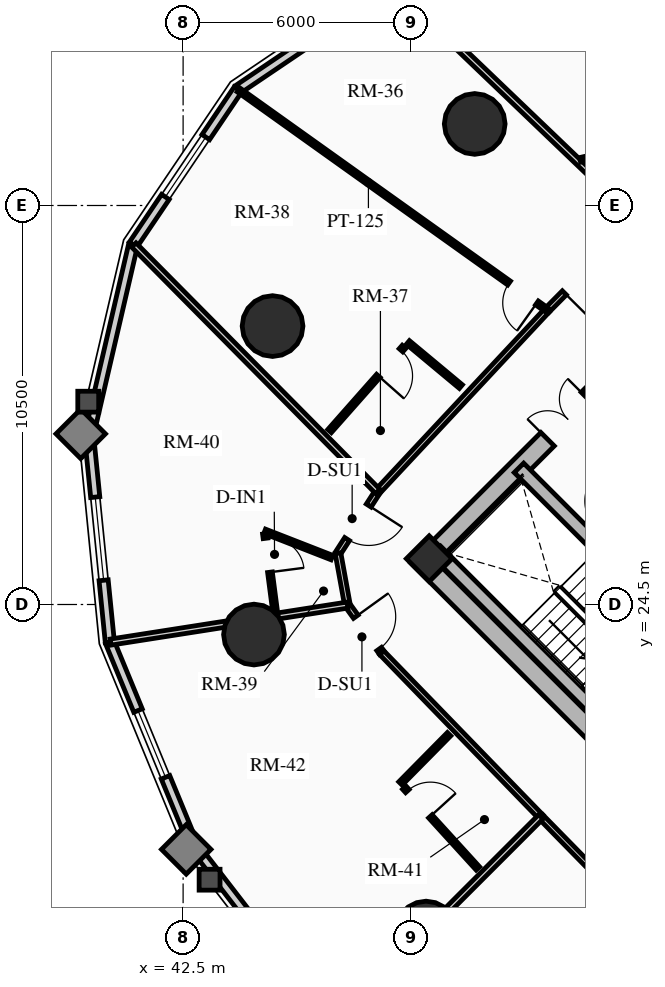
"""IFC4 building model, lengths in metres.
Left out: names, types, materials, properties, quantities, classifications, styles, units other than length and angle.
Written with IfcOpenShell. Run it as: python <this file> out.ifc"""

import sys

from ifc_helpers import new_model, si_unit, direction, frame, frame_2d, origin, origin_2d, place, context, subcontext, project, spatial, rectangle, circle, extrude, source, transform, mapped, element, fill, save


model = new_model("IFC4")
c1 = context("Model", 3, precision=1e-05, world=origin(), true_north=direction((0.0, 1.0)))
c2 = subcontext(c1, "Body", "Model", "MODEL_VIEW")
j1 = project(units=[si_unit("LENGTHUNIT", "METRE"), si_unit("PLANEANGLEUNIT", "RADIAN")], contexts=[c1])
p1 = place(None, origin())
s1 = spatial("IfcSite", under=j1, at=p1, CompositionType="ELEMENT")
p2 = place(p1, origin())
s2 = spatial("IfcBuilding", under=s1, at=p2, CompositionType="ELEMENT")
p3 = place(p2, frame((0.0, 0.0, 48.19)))
s3 = spatial("IfcBuildingStorey", under=s2, at=p3, CompositionType="ELEMENT", Elevation=48.19)
p4 = place(p3, frame((58.773, 15.661, 0.0), z_axis=(0.0, 0.0, 1.0), x_axis=(-0.707106781187, 0.707106781187, 0.0)))
e1 = element("IfcWall", 1, at=p4, inside=s3, PredefinedType="SHEAR", context=c2, shape_type="SweptSolid", body=[
    extrude(rectangle(XDim=14.3, YDim=0.5, at=frame_2d((7.15, 0.0))), origin(), (0.0, 0.0, 1.0), 2.91),
])
p5 = place(p3, frame((48.838, 25.596, 0.0), z_axis=(0.0, 0.0, 1.0), x_axis=(0.707106781187, 0.707106781187, 0.0)))
e2 = element("IfcWall", 2, at=p5, inside=s3, PredefinedType="SHEAR", context=c2, shape_type="SweptSolid", body=[
    extrude(rectangle(XDim=10.7, YDim=0.5, at=frame_2d((5.35, 0.0))), origin(), (0.0, 0.0, 1.0), 2.91),
])
m1 = source(origin(), c2, "Body", "SweptSolid", [
    extrude(rectangle(XDim=1.5, YDim=2.02, at=frame_2d((0.75, 1.01))), frame((0.0, 0.26, 0.0), z_axis=(0.0, -1.0, 0.0), x_axis=(1.0, 0.0, 0.0)), (0.0, 0.0, 1.0), 0.52),
])
p6 = place(p5, frame((4.6, 0.0, 0.0)))
e3 = element("IfcOpeningElement", 3, at=p6, cuts=e2, PredefinedType="OPENING", context=c2, shape_type="MappedRepresentation", body=[
    mapped(m1, transform((0.0, 0.0, 0.0), x_axis=(1.0, 0.0, 0.0), y_axis=(0.0, 1.0, 0.0), z_axis=(0.0, 0.0, 1.0), scale=1.0)),
])
p7 = place(p3, frame((61.096, 18.338, 0.0), z_axis=(0.0, 0.0, 1.0), x_axis=(-0.707106781187, 0.707106781187, 0.0)))
e4 = element("IfcWall", 4, at=p7, inside=s3, PredefinedType="SHEAR", context=c2, shape_type="SweptSolid", body=[
    extrude(rectangle(XDim=13.8, YDim=0.35, at=frame_2d((6.9, 0.0))), origin(), (0.0, 0.0, 1.0), 2.91),
])
m2 = source(origin(), c2, "Body", "SweptSolid", [
    extrude(rectangle(XDim=1.1, YDim=2.015, at=frame_2d((0.55, 1.007))), frame((0.0, 0.185, 0.0), z_axis=(0.0, -1.0, 0.0), x_axis=(1.0, 0.0, 0.0)), (0.0, 0.0, 1.0), 0.37),
])
p8 = place(p7, frame((4.9, 0.0, 0.0)))
e5 = element("IfcOpeningElement", 5, at=p8, cuts=e4, PredefinedType="OPENING", context=c2, shape_type="MappedRepresentation", body=[
    mapped(m2, transform((0.0, 0.0, 0.0), x_axis=(1.0, 0.0, 0.0), y_axis=(0.0, 1.0, 0.0), z_axis=(0.0, 0.0, 1.0), scale=1.0)),
])
m3 = source(origin(), c2, "Body", "SweptSolid", [
    extrude(rectangle(XDim=1.15, YDim=2.02, at=frame_2d((0.575, 1.01))), frame((0.0, 0.185, 0.0), z_axis=(0.0, -1.0, 0.0), x_axis=(1.0, 0.0, 0.0)), (0.0, 0.0, 1.0), 0.37),
])
p9 = place(p7, frame((7.32, 0.0, 0.0)))
e6 = element("IfcOpeningElement", 6, at=p9, cuts=e4, PredefinedType="OPENING", context=c2, shape_type="MappedRepresentation", body=[
    mapped(m3, transform((0.0, 0.0, 0.0), x_axis=(1.0, 0.0, 0.0), y_axis=(0.0, 1.0, 0.0), z_axis=(0.0, 0.0, 1.0), scale=1.0)),
])
p10 = place(p3, frame((53.922, 21.141, 0.0), z_axis=(0.0, 0.0, 1.0), x_axis=(-0.707106781187, 0.707106781187, 0.0)))
e7 = element("IfcWall", 7, at=p10, inside=s3, PredefinedType="SHEAR", context=c2, shape_type="SweptSolid", body=[
    extrude(rectangle(XDim=6.745, YDim=0.35, at=frame_2d((3.373, 0.0))), origin(), (0.0, 0.0, 1.0), 2.91),
])
p11 = place(p3, frame((48.976, 25.706, 0.0), z_axis=(0.0, 0.0, 1.0), x_axis=(0.707106781187, 0.707106781187, 0.0)))
e8 = element("IfcColumn", 8, at=p11, inside=s3, PredefinedType="COLUMN", context=c2, shape_type="SweptSolid", body=[
    extrude(rectangle(XDim=0.85, YDim=0.85, at=origin_2d()), origin(), (0.0, 0.0, 1.0), 2.91),
])
for number, where, z_axis, x_axis in (
    (9, (50.173, 37.146, 0.0), (0.0, 0.0, 1.0), (1.0, 0.0, 0.0)),
    (10, (44.854, 31.827, 0.0), (0.0, 0.0, 1.0), (1.0, 0.0, 0.0)),
    (11, (44.365, 23.709, 0.0), (0.0, 0.0, 1.0), (1.0, 0.0, 0.0)),
    (12, (48.893, 15.893, 0.0), (0.0, 0.0, 1.0), (1.0, 0.0, 0.0)),
):
    element("IfcColumn", number, at=place(p3, frame(where, z_axis=z_axis, x_axis=x_axis)), inside=s3, PredefinedType="USERDEFINED", context=c2, shape_type="SweptSolid", body=[
        extrude(circle(Radius=0.8, at=origin_2d()), origin(), (0.0, 0.0, 1.0), 2.91),
    ])
p12 = place(p3, frame((43.945, 38.055, 0.0), z_axis=(0.0, 0.0, 1.0), x_axis=(0.828736708604, 0.559638693991, 0.0)))
e13 = element("IfcWall", 13, at=p12, inside=s3, PredefinedType="SOLIDWALL", context=c2, shape_type="SweptSolid", body=[
    extrude(rectangle(XDim=4.93, YDim=0.24, at=frame_2d((2.465, 0.0))), origin(), (0.0, 0.0, 1.0), 2.073),
])
p13 = place(p3, frame((41.186, 33.969, 0.0), z_axis=(0.0, 0.0, 1.0), x_axis=(0.559638693991, 0.828736708604, 0.0)))
e14 = element("IfcWall", 14, at=p13, inside=s3, PredefinedType="SOLIDWALL", context=c2, shape_type="SweptSolid", body=[
    extrude(rectangle(XDim=4.93, YDim=0.24, at=frame_2d((2.465, 0.0))), origin(), (0.0, 0.0, 1.0), 2.073),
])
m4 = source(origin(), c2, "Body", "SweptSolid", [
    extrude(rectangle(XDim=1.9, YDim=1.35, at=frame_2d((0.95, 0.675))), frame((0.0, 0.13, 0.0), z_axis=(0.0, -1.0, 0.0), x_axis=(1.0, 0.0, 0.0)), (0.0, 0.0, 1.0), 0.26),
])
p14 = place(p13, frame((1.515, 0.0, 0.65)))
e15 = element("IfcOpeningElement", 15, at=p14, cuts=e14, PredefinedType="OPENING", context=c2, shape_type="MappedRepresentation", body=[
    mapped(m4, transform((0.0, 0.0, 0.0), x_axis=(1.0, 0.0, 0.0), y_axis=(0.0, 1.0, 0.0), z_axis=(0.0, 0.0, 1.0), scale=1.0)),
])
p15 = place(p3, frame((40.024, 28.957, 0.0), z_axis=(0.0, 0.0, 1.0), x_axis=(0.225833060959, 0.974166016949, 0.0)))
e16 = element("IfcWall", 16, at=p15, inside=s3, PredefinedType="SOLIDWALL", context=c2, shape_type="SweptSolid", body=[
    extrude(rectangle(XDim=5.146, YDim=0.24, at=frame_2d((2.573, 0.0))), origin(), (0.0, 0.0, 1.0), 2.073),
])
p16 = place(p3, frame((40.572, 23.507, 0.0), z_axis=(0.0, 0.0, 1.0), x_axis=(-0.100165739718, 0.994970765694, 0.0)))
e17 = element("IfcWall", 17, at=p16, inside=s3, PredefinedType="SOLIDWALL", context=c2, shape_type="SweptSolid", body=[
    extrude(rectangle(XDim=5.477, YDim=0.24, at=frame_2d((2.738, 0.0))), origin(), (0.0, 0.0, 1.0), 2.073),
])
m5 = source(origin(), c2, "Body", "SweptSolid", [
    extrude(rectangle(XDim=2.2, YDim=1.35, at=frame_2d((1.1, 0.675))), frame((0.0, 0.13, 0.0), z_axis=(0.0, -1.0, 0.0), x_axis=(1.0, 0.0, 0.0)), (0.0, 0.0, 1.0), 0.26),
])
p17 = place(p16, frame((1.638, 0.0, 0.65)))
e18 = element("IfcOpeningElement", 18, at=p17, cuts=e17, PredefinedType="OPENING", context=c2, shape_type="MappedRepresentation", body=[
    mapped(m5, transform((0.0, 0.0, 0.0), x_axis=(1.0, 0.0, 0.0), y_axis=(0.0, 1.0, 0.0), z_axis=(0.0, 0.0, 1.0), scale=1.0)),
])
p18 = place(p3, frame((42.778, 18.156, 0.0), z_axis=(0.0, 0.0, 1.0), x_axis=(-0.381027682565, 0.924563629567, 0.0)))
e19 = element("IfcWall", 19, at=p18, inside=s3, PredefinedType="SOLIDWALL", context=c2, shape_type="SweptSolid", body=[
    extrude(rectangle(XDim=5.789, YDim=0.24, at=frame_2d((2.894, 0.0))), origin(), (0.0, 0.0, 1.0), 2.073),
])
p19 = place(p18, frame((1.944, 0.0, 0.65)))
e20 = element("IfcOpeningElement", 20, at=p19, cuts=e19, PredefinedType="OPENING", context=c2, shape_type="MappedRepresentation", body=[
    mapped(m4, transform((0.0, 0.0, 0.0), x_axis=(1.0, 0.0, 0.0), y_axis=(0.0, 1.0, 0.0), z_axis=(0.0, 0.0, 1.0), scale=1.0)),
])
p20 = place(p3, frame((46.425, 13.425, 0.0), z_axis=(0.0, 0.0, 1.0), x_axis=(-0.610502519057, 0.792014314407, 0.0)))
e21 = element("IfcWall", 21, at=p20, inside=s3, PredefinedType="SOLIDWALL", context=c2, shape_type="SweptSolid", body=[
    extrude(rectangle(XDim=5.973, YDim=0.24, at=frame_2d((2.987, 0.0))), origin(), (0.0, 0.0, 1.0), 2.073),
])
p21 = place(p3, frame((54.461, 34.648, 0.0), z_axis=(0.0, 0.0, 1.0), x_axis=(-0.70403409755, -0.710166170334, 0.0)))
e22 = element("IfcWall", 22, at=p21, inside=s3, PredefinedType="PARTITIONING", context=c2, shape_type="SweptSolid", body=[
    extrude(rectangle(XDim=3.384, YDim=0.15, at=frame_2d((1.692, 0.0))), origin(), (0.0, 0.0, 1.0), 2.159),
])
m6 = source(origin(), c2, "Body", "SweptSolid", [
    extrude(rectangle(XDim=1.05, YDim=2.015, at=frame_2d((0.525, 1.007))), frame((0.0, 0.085, 0.0), z_axis=(0.0, -1.0, 0.0), x_axis=(1.0, 0.0, 0.0)), (0.0, 0.0, 1.0), 0.17),
])
p22 = place(p21, frame((1.691, 0.0, 0.0)))
e23 = element("IfcOpeningElement", 23, at=p22, cuts=e22, PredefinedType="OPENING", context=c2, shape_type="MappedRepresentation", body=[
    mapped(m6, transform((0.0, 0.0, 0.0), x_axis=(1.0, 0.0, 0.0), y_axis=(0.0, 1.0, 0.0), z_axis=(0.0, 0.0, 1.0), scale=1.0)),
])
p23 = place(p3, frame((52.079, 32.244, 0.0), z_axis=(0.0, 0.0, 1.0), x_axis=(-0.682703325574, -0.730695674854, 0.0)))
e24 = element("IfcWall", 24, at=p23, inside=s3, PredefinedType="PARTITIONING", context=c2, shape_type="SweptSolid", body=[
    extrude(rectangle(XDim=6.527, YDim=0.15, at=frame_2d((3.263, 0.0))), origin(), (0.0, 0.0, 1.0), 2.159),
])
p24 = place(p3, frame((47.623, 27.475, 0.0), z_axis=(0.0, 0.0, 1.0), x_axis=(-0.54158041545, -0.840648947898, 0.0)))
e25 = element("IfcWall", 25, at=p24, inside=s3, PredefinedType="PARTITIONING", context=c2, shape_type="SweptSolid", body=[
    extrude(rectangle(XDim=1.934, YDim=0.15, at=frame_2d((0.967, 0.0))), origin(), (0.0, 0.0, 1.0), 2.159),
])
p25 = place(p24, frame((0.442, 0.0, 0.0)))
e26 = element("IfcOpeningElement", 26, at=p25, cuts=e25, PredefinedType="OPENING", context=c2, shape_type="MappedRepresentation", body=[
    mapped(m6, transform((0.0, 0.0, 0.0), x_axis=(1.0, 0.0, 0.0), y_axis=(0.0, 1.0, 0.0), z_axis=(0.0, 0.0, 1.0), scale=1.0)),
])
p26 = place(p3, frame((46.576, 25.85, 0.0), z_axis=(0.0, 0.0, 1.0), x_axis=(0.178962865041, -0.983855829345, 0.0)))
e27 = element("IfcWall", 27, at=p26, inside=s3, PredefinedType="PARTITIONING", context=c2, shape_type="SweptSolid", body=[
    extrude(rectangle(XDim=1.387, YDim=0.15, at=frame_2d((0.694, 0.0))), origin(), (0.0, 0.0, 1.0), 2.159),
])
p27 = place(p3, frame((46.824, 24.485, 0.0), z_axis=(0.0, 0.0, 1.0), x_axis=(0.584890953925, -0.811111935565, 0.0)))
e28 = element("IfcWall", 28, at=p27, inside=s3, PredefinedType="PARTITIONING", context=c2, shape_type="SweptSolid", body=[
    extrude(rectangle(XDim=1.547, YDim=0.15, at=frame_2d((0.773, 0.0))), origin(), (0.0, 0.0, 1.0), 2.205),
])
p28 = place(p27, frame((0.377, 0.0, 0.0)))
e29 = element("IfcOpeningElement", 29, at=p28, cuts=e28, PredefinedType="OPENING", context=c2, shape_type="MappedRepresentation", body=[
    mapped(m6, transform((0.0, 0.0, 0.0), x_axis=(1.0, 0.0, 0.0), y_axis=(0.0, 1.0, 0.0), z_axis=(0.0, 0.0, 1.0), scale=1.0)),
])
p29 = place(p3, frame((47.729, 23.23, 0.0), z_axis=(0.0, 0.0, 1.0), x_axis=(0.696119834292, -0.717925606386, 0.0)))
e30 = element("IfcWall", 30, at=p29, inside=s3, PredefinedType="PARTITIONING", context=c2, shape_type="SweptSolid", body=[
    extrude(rectangle(XDim=6.012, YDim=0.15, at=frame_2d((3.006, 0.0))), origin(), (0.0, 0.0, 1.0), 2.635),
])
p30 = place(p3, frame((51.914, 18.914, 0.0), z_axis=(0.0, 0.0, 1.0), x_axis=(0.6999614951, -0.71418058317, 0.0)))
e31 = element("IfcWall", 31, at=p30, inside=s3, PredefinedType="PARTITIONING", context=c2, shape_type="SweptSolid", body=[
    extrude(rectangle(XDim=6.13, YDim=0.15, at=frame_2d((3.065, 0.0))), origin(), (0.0, 0.0, 1.0), 2.159),
])
p31 = place(p30, frame((2.54, 0.0, 0.0)))
e32 = element("IfcOpeningElement", 32, at=p31, cuts=e31, PredefinedType="OPENING", context=c2, shape_type="MappedRepresentation", body=[
    mapped(m6, transform((0.0, 0.0, 0.0), x_axis=(1.0, 0.0, 0.0), y_axis=(0.0, 1.0, 0.0), z_axis=(0.0, 0.0, 1.0), scale=1.0)),
])
p32 = place(p3, frame((54.461, 34.648, 0.0), z_axis=(0.0, 0.0, 1.0), x_axis=(-0.722290498621, 0.691589788532, 0.0)))
e33 = element("IfcWall", 33, at=p32, inside=s3, PredefinedType="PARTITIONING", context=c2, shape_type="SweptSolid", body=[
    extrude(rectangle(XDim=8.891, YDim=0.16, at=frame_2d((4.445, 0.0))), origin(), (0.0, 0.0, 1.0), 2.073),
])
p33 = place(p3, frame((47.623, 27.475, 0.0), z_axis=(0.0, 0.0, 1.0), x_axis=(-0.703512438021, 0.71068294587, 0.0)))
e34 = element("IfcWall", 34, at=p33, inside=s3, PredefinedType="PARTITIONING", context=c2, shape_type="SweptSolid", body=[
    extrude(rectangle(XDim=9.125, YDim=0.16, at=frame_2d((4.562, 0.0))), origin(), (0.0, 0.0, 1.0), 2.073),
])
p34 = place(p3, frame((46.824, 24.485, 0.0), z_axis=(0.0, 0.0, 1.0), x_axis=(-0.988003730645, -0.154430010784, 0.0)))
e35 = element("IfcWall", 35, at=p34, inside=s3, PredefinedType="PARTITIONING", context=c2, shape_type="SweptSolid", body=[
    extrude(rectangle(XDim=6.308, YDim=0.16, at=frame_2d((3.154, 0.0))), origin(), (0.0, 0.0, 1.0), 2.073),
])
p35 = place(p3, frame((51.914, 18.914, 0.0), z_axis=(0.0, 0.0, 1.0), x_axis=(-0.707106781187, -0.707106781187, 0.0)))
e36 = element("IfcWall", 36, at=p35, inside=s3, PredefinedType="PARTITIONING", context=c2, shape_type="SweptSolid", body=[
    extrude(rectangle(XDim=7.743, YDim=0.16, at=frame_2d((3.872, 0.0))), origin(), (0.0, 0.0, 1.0), 2.073),
])
p36 = place(p3, frame((54.878, 36.644, 0.0), z_axis=(0.0, 0.0, 1.0), x_axis=(-0.974554917581, -0.224148862631, 0.0)))
e37 = element("IfcWall", 37, at=p36, inside=s3, PredefinedType="PARTITIONING", context=c2, shape_type="SweptSolid", body=[
    extrude(rectangle(XDim=1.982, YDim=0.125, at=frame_2d((0.991, 0.0))), origin(), (0.0, 0.0, 1.0), 2.635),
])
m7 = source(origin(), c2, "Body", "SweptSolid", [
    extrude(rectangle(XDim=0.9, YDim=2.005, at=frame_2d((0.45, 1.002))), frame((0.0, 0.073, 0.0), z_axis=(0.0, -1.0, 0.0), x_axis=(1.0, 0.0, 0.0)), (0.0, 0.0, 1.0), 0.145),
])
p37 = place(p36, frame((0.436, 0.0, 0.0)))
e38 = element("IfcOpeningElement", 38, at=p37, cuts=e37, PredefinedType="OPENING", context=c2, shape_type="MappedRepresentation", body=[
    mapped(m7, transform((0.0, 0.0, 0.0), x_axis=(1.0, 0.0, 0.0), y_axis=(0.0, 1.0, 0.0), z_axis=(0.0, 0.0, 1.0), scale=1.0)),
])
p38 = place(p3, frame((52.079, 32.244, 0.0), z_axis=(0.0, 0.0, 1.0), x_axis=(-0.813888867537, 0.581020577346, 0.0)))
e39 = element("IfcWall", 39, at=p38, inside=s3, PredefinedType="PARTITIONING", context=c2, shape_type="SweptSolid", body=[
    extrude(rectangle(XDim=9.977, YDim=0.125, at=frame_2d((4.988, 0.0))), origin(), (0.0, 0.0, 1.0), 2.073),
])
p39 = place(p38, frame((0.33, 0.0, 0.0)))
e40 = element("IfcOpeningElement", 40, at=p39, cuts=e39, PredefinedType="OPENING", context=c2, shape_type="MappedRepresentation", body=[
    mapped(m7, transform((0.0, 0.0, 0.0), x_axis=(1.0, 0.0, 0.0), y_axis=(0.0, 1.0, 0.0), z_axis=(0.0, 0.0, 1.0), scale=1.0)),
])
p40 = place(p3, frame((49.809, 30.234, 0.0), z_axis=(0.0, 0.0, 1.0), x_axis=(-0.76830950514, 0.640078514177, 0.0)))
e41 = element("IfcWall", 41, at=p40, inside=s3, PredefinedType="PARTITIONING", context=c2, shape_type="SweptSolid", body=[
    extrude(rectangle(XDim=1.814, YDim=0.125, at=frame_2d((0.907, 0.0))), origin(), (0.0, 0.0, 1.0), 2.635),
])
p41 = place(p3, frame((48.313, 31.28, 0.0), z_axis=(0.0, 0.0, 1.0), x_axis=(-0.662230126621, -0.749300513409, 0.0)))
e42 = element("IfcWall", 42, at=p41, inside=s3, PredefinedType="PARTITIONING", context=c2, shape_type="SweptSolid", body=[
    extrude(rectangle(XDim=2.958, YDim=0.125, at=frame_2d((1.479, 0.0))), origin(), (0.0, 0.0, 1.0), 2.159),
])
p42 = place(p41, frame((0.12, 0.0, 0.0)))
e43 = element("IfcOpeningElement", 43, at=p42, cuts=e42, PredefinedType="OPENING", context=c2, shape_type="MappedRepresentation", body=[
    mapped(m7, transform((0.0, 0.0, 0.0), x_axis=(1.0, 0.0, 0.0), y_axis=(0.0, 1.0, 0.0), z_axis=(0.0, 0.0, 1.0), scale=1.0)),
])
p43 = place(p3, frame((46.416, 25.735, 0.0), z_axis=(0.0, 0.0, 1.0), x_axis=(-0.931623241188, 0.363425558373, 0.0)))
e44 = element("IfcWall", 44, at=p43, inside=s3, PredefinedType="PARTITIONING", context=c2, shape_type="SweptSolid", body=[
    extrude(rectangle(XDim=1.9, YDim=0.125, at=frame_2d((0.95, 0.0))), origin(), (0.0, 0.0, 1.0), 2.635),
])
p44 = place(p3, frame((44.654, 26.361, 0.0), z_axis=(0.0, 0.0, 1.0), x_axis=(0.129433729192, -0.991588074629, 0.0)))
e45 = element("IfcWall", 45, at=p44, inside=s3, PredefinedType="PARTITIONING", context=c2, shape_type="SweptSolid", body=[
    extrude(rectangle(XDim=2.097, YDim=0.125, at=frame_2d((1.049, 0.0))), origin(), (0.0, 0.0, 1.0), 2.073),
])
p45 = place(p44, frame((0.12, 0.0, 0.0)))
e46 = element("IfcOpeningElement", 46, at=p45, cuts=e45, PredefinedType="OPENING", context=c2, shape_type="MappedRepresentation", body=[
    mapped(m7, transform((0.0, 0.0, 0.0), x_axis=(1.0, 0.0, 0.0), y_axis=(0.0, 1.0, 0.0), z_axis=(0.0, 0.0, 1.0), scale=1.0)),
])
p46 = place(p3, frame((49.498, 21.087, 0.0), z_axis=(0.0, 0.0, 1.0), x_axis=(-0.702129708151, -0.71204906638, 0.0)))
e47 = element("IfcWall", 47, at=p46, inside=s3, PredefinedType="PARTITIONING", context=c2, shape_type="SweptSolid", body=[
    extrude(rectangle(XDim=1.821, YDim=0.125, at=frame_2d((0.911, 0.0))), origin(), (0.0, 0.0, 1.0), 2.635),
])
p47 = place(p3, frame((48.32, 19.68, 0.0), z_axis=(0.0, 0.0, 1.0), x_axis=(0.673403410236, -0.739275217414, 0.0)))
e48 = element("IfcWall", 48, at=p47, inside=s3, PredefinedType="PARTITIONING", context=c2, shape_type="SweptSolid", body=[
    extrude(rectangle(XDim=2.876, YDim=0.125, at=frame_2d((1.438, 0.0))), origin(), (0.0, 0.0, 1.0), 2.635),
])
p48 = place(p47, frame((0.12, 0.0, 0.0)))
e49 = element("IfcOpeningElement", 49, at=p48, cuts=e48, PredefinedType="OPENING", context=c2, shape_type="MappedRepresentation", body=[
    mapped(m7, transform((0.0, 0.0, 0.0), x_axis=(1.0, 0.0, 0.0), y_axis=(0.0, 1.0, 0.0), z_axis=(0.0, 0.0, 1.0), scale=1.0)),
])
m8 = source(origin(), c2, "Body", "SweptSolid", [
    extrude(rectangle(XDim=1.9, YDim=1.35, at=frame_2d((0.95, 0.675))), frame((0.0, 0.03, 0.0), z_axis=(0.0, -1.0, 0.0), x_axis=(1.0, 0.0, 0.0)), (0.0, 0.0, 1.0), 0.06),
])
p49 = place(p14, origin())
e50 = element("IfcWindow", 50, at=p49, inside=s3, PartitioningType="DOUBLE_PANEL_VERTICAL", PredefinedType="WINDOW", context=c2, shape_type="MappedRepresentation", body=[
    mapped(m8, transform((0.0, 0.0, 0.0), x_axis=(1.0, 0.0, 0.0), y_axis=(0.0, 1.0, 0.0), z_axis=(0.0, 0.0, 1.0), scale=1.0)),
])
fill(e15, e50)
m9 = source(origin(), c2, "Body", "SweptSolid", [
    extrude(rectangle(XDim=2.2, YDim=1.35, at=frame_2d((1.1, 0.675))), frame((0.0, 0.03, 0.0), z_axis=(0.0, -1.0, 0.0), x_axis=(1.0, 0.0, 0.0)), (0.0, 0.0, 1.0), 0.06),
])
p50 = place(p17, origin())
e51 = element("IfcWindow", 51, at=p50, inside=s3, PartitioningType="DOUBLE_PANEL_VERTICAL", PredefinedType="WINDOW", context=c2, shape_type="MappedRepresentation", body=[
    mapped(m9, transform((0.0, 0.0, 0.0), x_axis=(1.0, 0.0, 0.0), y_axis=(0.0, 1.0, 0.0), z_axis=(0.0, 0.0, 1.0), scale=1.0)),
])
fill(e18, e51)
p51 = place(p19, origin())
e52 = element("IfcWindow", 52, at=p51, inside=s3, PartitioningType="DOUBLE_PANEL_VERTICAL", PredefinedType="WINDOW", context=c2, shape_type="MappedRepresentation", body=[
    mapped(m8, transform((0.0, 0.0, 0.0), x_axis=(1.0, 0.0, 0.0), y_axis=(0.0, 1.0, 0.0), z_axis=(0.0, 0.0, 1.0), scale=1.0)),
])
fill(e20, e52)
m10 = source(origin(), c2, "Body", "SweptSolid", [
    extrude(rectangle(XDim=1.5, YDim=2.02, at=frame_2d((0.75, 1.01))), frame((0.0, 0.025, 0.0), z_axis=(0.0, -1.0, 0.0), x_axis=(1.0, 0.0, 0.0)), (0.0, 0.0, 1.0), 0.05),
])
p52 = place(p6, origin())
e53 = element("IfcDoor", 53, at=p52, inside=s3, OperationType="DOUBLE_DOOR_SINGLE_SWING", PredefinedType="DOOR", context=c2, shape_type="MappedRepresentation", body=[
    mapped(m10, transform((0.0, 0.0, 0.0), x_axis=(1.0, 0.0, 0.0), y_axis=(0.0, 1.0, 0.0), z_axis=(0.0, 0.0, 1.0), scale=1.0)),
])
fill(e3, e53)
m11 = source(origin(), c2, "Body", "SweptSolid", [
    extrude(rectangle(XDim=1.05, YDim=2.015, at=frame_2d((0.525, 1.007))), frame((0.0, 0.025, 0.0), z_axis=(0.0, -1.0, 0.0), x_axis=(1.0, 0.0, 0.0)), (0.0, 0.0, 1.0), 0.05),
])
p53 = place(p22, origin())
e54 = element("IfcDoor", 54, at=p53, inside=s3, OperationType="SINGLE_SWING_RIGHT", PredefinedType="DOOR", context=c2, shape_type="MappedRepresentation", body=[
    mapped(m11, transform((0.0, 0.0, 0.0), x_axis=(1.0, 0.0, 0.0), y_axis=(0.0, 1.0, 0.0), z_axis=(0.0, 0.0, 1.0), scale=1.0)),
])
fill(e23, e54)
m12 = source(origin(), c2, "Body", "SweptSolid", [
    extrude(rectangle(XDim=0.9, YDim=2.005, at=frame_2d((0.45, 1.002))), frame((0.0, 0.025, 0.0), z_axis=(0.0, -1.0, 0.0), x_axis=(1.0, 0.0, 0.0)), (0.0, 0.0, 1.0), 0.05),
])
p54 = place(p39, origin())
e55 = element("IfcDoor", 55, at=p54, inside=s3, OperationType="SINGLE_SWING_LEFT", PredefinedType="DOOR", context=c2, shape_type="MappedRepresentation", body=[
    mapped(m12, transform((0.0, 0.0, 0.0), x_axis=(1.0, 0.0, 0.0), y_axis=(0.0, 1.0, 0.0), z_axis=(0.0, 0.0, 1.0), scale=1.0)),
])
fill(e40, e55)
p55 = place(p42, origin())
e56 = element("IfcDoor", 56, at=p55, inside=s3, OperationType="SINGLE_SWING_RIGHT", PredefinedType="DOOR", context=c2, shape_type="MappedRepresentation", body=[
    mapped(m12, transform((0.0, 0.0, 0.0), x_axis=(1.0, 0.0, 0.0), y_axis=(0.0, 1.0, 0.0), z_axis=(0.0, 0.0, 1.0), scale=1.0)),
])
fill(e43, e56)
p56 = place(p25, origin())
e57 = element("IfcDoor", 57, at=p56, inside=s3, OperationType="SINGLE_SWING_LEFT", PredefinedType="DOOR", context=c2, shape_type="MappedRepresentation", body=[
    mapped(m11, transform((0.0, 0.0, 0.0), x_axis=(1.0, 0.0, 0.0), y_axis=(0.0, 1.0, 0.0), z_axis=(0.0, 0.0, 1.0), scale=1.0)),
])
fill(e26, e57)
p57 = place(p45, origin())
e58 = element("IfcDoor", 58, at=p57, inside=s3, OperationType="SINGLE_SWING_RIGHT", PredefinedType="DOOR", context=c2, shape_type="MappedRepresentation", body=[
    mapped(m12, transform((0.0, 0.0, 0.0), x_axis=(1.0, 0.0, 0.0), y_axis=(0.0, 1.0, 0.0), z_axis=(0.0, 0.0, 1.0), scale=1.0)),
])
fill(e46, e58)
p58 = place(p28, origin())
e59 = element("IfcDoor", 59, at=p58, inside=s3, OperationType="SINGLE_SWING_LEFT", PredefinedType="DOOR", context=c2, shape_type="MappedRepresentation", body=[
    mapped(m11, transform((0.0, 0.0, 0.0), x_axis=(1.0, 0.0, 0.0), y_axis=(0.0, 1.0, 0.0), z_axis=(0.0, 0.0, 1.0), scale=1.0)),
])
fill(e29, e59)
p59 = place(p48, origin())
e60 = element("IfcDoor", 60, at=p59, inside=s3, OperationType="SINGLE_SWING_RIGHT", PredefinedType="DOOR", context=c2, shape_type="MappedRepresentation", body=[
    mapped(m12, transform((0.0, 0.0, 0.0), x_axis=(1.0, 0.0, 0.0), y_axis=(0.0, 1.0, 0.0), z_axis=(0.0, 0.0, 1.0), scale=1.0)),
])
fill(e49, e60)
save(model, sys.argv[1])
